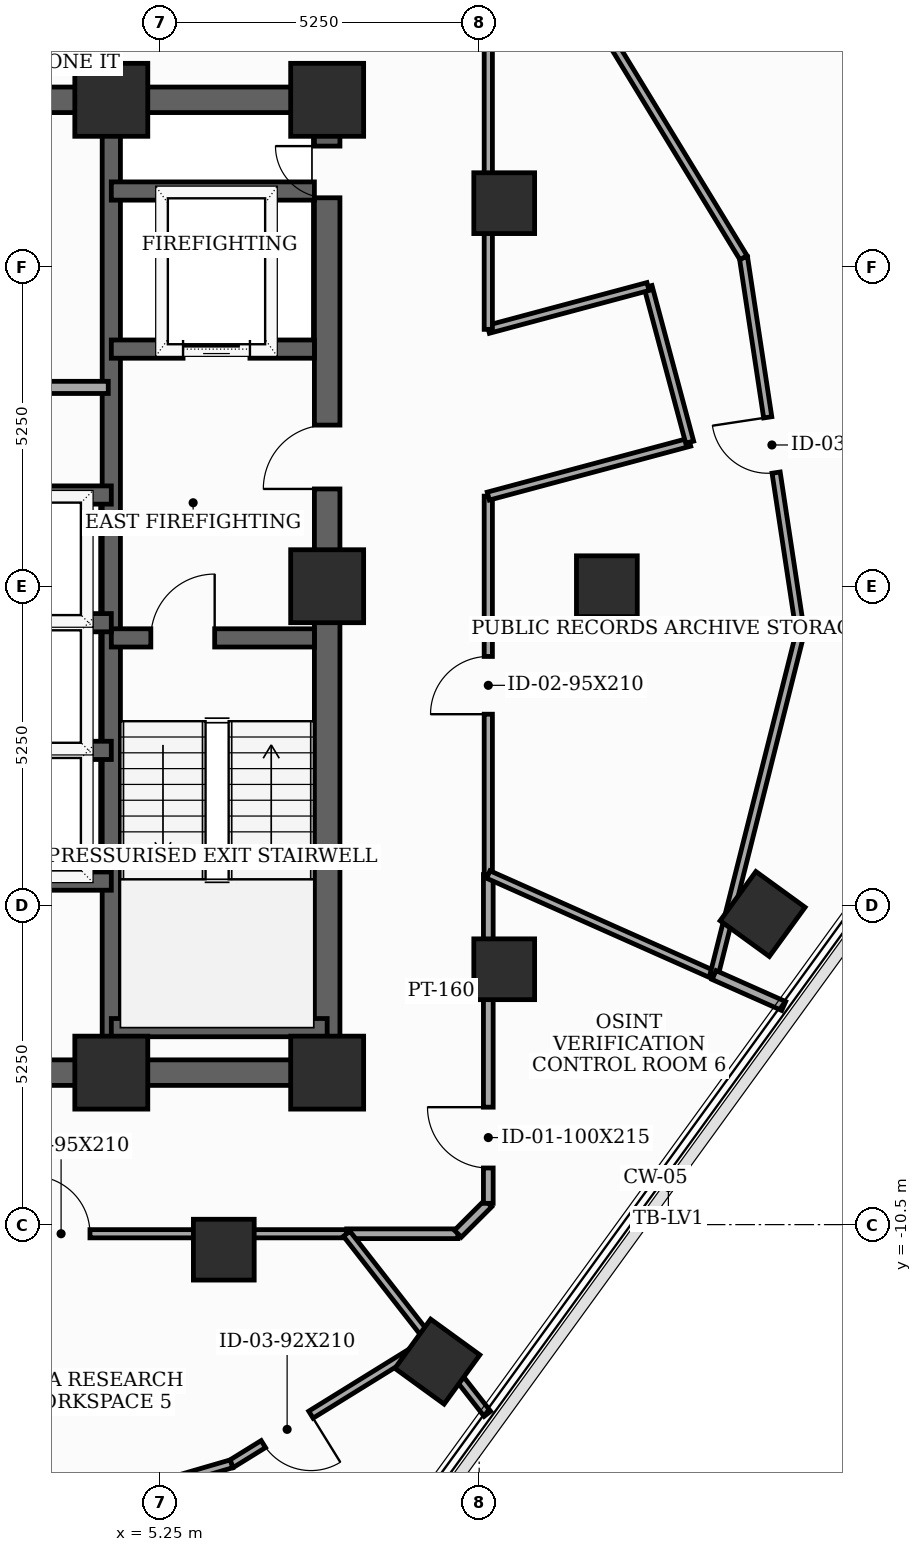
"""IFC4 building model, lengths in metres.
Left out: names, types, materials, properties, quantities, classifications, styles, units other than length and angle.
Written with IfcOpenShell. Run it as: python <this file> out.ifc"""

import sys

from ifc_helpers import new_model, si_unit, direction, frame, frame_2d, origin, origin_2d, place, context, subcontext, project, spatial, rectangle, extrude, element, fill, save


model = new_model("IFC4")
c1 = context("Model", 3, precision=1e-05, world=origin(), true_north=direction((0.0, 1.0)))
c2 = subcontext(c1, "Body", "Model", "MODEL_VIEW")
j1 = project(units=[si_unit("LENGTHUNIT", "METRE"), si_unit("PLANEANGLEUNIT", "RADIAN")], contexts=[c1])
p1 = place(None, origin())
s1 = spatial("IfcSite", under=j1, at=p1, CompositionType="ELEMENT")
p2 = place(p1, origin())
s2 = spatial("IfcBuilding", under=s1, at=p2, CompositionType="ELEMENT")
p3 = place(p2, frame((0.0, 0.0, 230.0)))
s3 = spatial("IfcBuildingStorey", under=s2, at=p3, CompositionType="ELEMENT", Elevation=230.0)
for number, where, z_axis, x_axis in (
    (1, (4.45, -8.0, 0.0), (0.0, 0.0, 1.0), (1.0, 0.0, 0.0)),
    (2, (8.0, -8.0, 0.0), (0.0, 0.0, 1.0), (1.0, 0.0, 0.0)),
    (3, (8.0, 0.0, 0.0), (0.0, 0.0, 1.0), (1.0, 0.0, 0.0)),
    (4, (8.0, 8.0, 0.0), (0.0, 0.0, 1.0), (1.0, 0.0, 0.0)),
    (5, (4.45, 8.0, 0.0), (0.0, 0.0, 1.0), (1.0, 0.0, 0.0)),
):
    element("IfcColumn", number, at=place(p3, frame(where, z_axis=z_axis, x_axis=x_axis)), inside=s3, PredefinedType="COLUMN", context=c2, shape_type="SweptSolid", body=[
        extrude(rectangle(XDim=1.2, YDim=1.2, at=origin_2d()), origin(), (0.0, 0.0, 1.0), 3.7),
    ])
for number, where, z_axis, x_axis in (
    (6, (12.6, 0.0, 0.0), (0.0, 0.0, 1.0), (1.0, 0.0, 0.0)),
    (7, (10.912, 6.3, 0.0), (0.0, 0.0, 1.0), (1.0, 0.0, 0.0)),
    (8, (6.3, -10.912, 0.0), (0.0, 0.0, 1.0), (1.0, 0.0, 0.0)),
    (9, (10.912, -6.3, 0.0), (0.0, 0.0, 1.0), (1.0, 0.0, 0.0)),
    (10, (9.812, -12.753, 0.0), (0.0, 0.0, 1.0), (0.588, 0.809, 0.0)),
    (11, (15.161, -5.391, 0.0), (0.0, 0.0, 1.0), (0.588, 0.809, 0.0)),
):
    element("IfcColumn", number, at=place(p3, frame(where, z_axis=z_axis, x_axis=x_axis)), inside=s3, PredefinedType="COLUMN", context=c2, shape_type="SweptSolid", body=[
        extrude(rectangle(XDim=1.0, YDim=1.0, at=origin_2d()), origin(), (0.0, 0.0, 1.0), 3.7),
    ])
p4 = place(p3, frame((8.0, -8.0, 0.0), z_axis=(0.0, 0.0, 1.0), x_axis=(0.0, 1.0, 0.0)))
e12 = element("IfcWall", 12, at=p4, inside=s3, PredefinedType="SHEAR", context=c2, shape_type="SweptSolid", body=[
    extrude(rectangle(XDim=16.0, YDim=0.42, at=frame_2d((8.0, 0.0))), origin(), (0.0, 0.0, 1.0), 3.5),
])
p5 = place(p4, frame((9.6, 0.0, 0.0)))
e13 = element("IfcOpeningElement", 13, at=p5, cuts=e12, PredefinedType="OPENING", context=c2, shape_type="SweptSolid", body=[
    extrude(rectangle(XDim=1.05, YDim=2.15, at=frame_2d((0.525, 1.075))), frame((0.0, 0.22, 0.0), z_axis=(0.0, -1.0, 0.0), x_axis=(1.0, 0.0, 0.0)), (0.0, 0.0, 1.0), 0.44),
])
p6 = place(p4, frame((14.389, 0.0, 0.0)))
e14 = element("IfcOpeningElement", 14, at=p6, cuts=e12, PredefinedType="OPENING", context=c2, shape_type="SweptSolid", body=[
    extrude(rectangle(XDim=0.85, YDim=2.02, at=frame_2d((0.425, 1.01))), frame((0.0, 0.22, 0.0), z_axis=(0.0, -1.0, 0.0), x_axis=(1.0, 0.0, 0.0)), (0.0, 0.0, 1.0), 0.44),
])
p7 = place(p3, frame((-8.0, -8.0, 0.0), z_axis=(0.0, 0.0, 1.0), x_axis=(1.0, 0.0, 0.0)))
e15 = element("IfcWall", 15, at=p7, inside=s3, PredefinedType="SHEAR", context=c2, shape_type="SweptSolid", body=[
    extrude(rectangle(XDim=16.0, YDim=0.42, at=frame_2d((8.0, 0.0))), origin(), (0.0, 0.0, 1.0), 3.5),
])
p8 = place(p7, frame((5.2, 0.0, 0.0)))
e16 = element("IfcOpeningElement", 16, at=p8, cuts=e15, PredefinedType="OPENING", context=c2, shape_type="SweptSolid", body=[
    extrude(rectangle(XDim=0.95, YDim=2.1, at=frame_2d((0.475, 1.05))), frame((0.0, 0.22, 0.0), z_axis=(0.0, -1.0, 0.0), x_axis=(1.0, 0.0, 0.0)), (0.0, 0.0, 1.0), 0.44),
])
p9 = place(p7, frame((9.8, 0.0, 0.0)))
e17 = element("IfcOpeningElement", 17, at=p9, cuts=e15, PredefinedType="OPENING", context=c2, shape_type="SweptSolid", body=[
    extrude(rectangle(XDim=0.95, YDim=2.1, at=frame_2d((0.475, 1.05))), frame((0.0, 0.22, 0.0), z_axis=(0.0, -1.0, 0.0), x_axis=(1.0, 0.0, 0.0)), (0.0, 0.0, 1.0), 0.44),
])
p10 = place(p3, frame((-8.0, 8.0, 0.0), z_axis=(0.0, 0.0, 1.0), x_axis=(1.0, 0.0, 0.0)))
e18 = element("IfcWall", 18, at=p10, inside=s3, PredefinedType="SHEAR", context=c2, shape_type="SweptSolid", body=[
    extrude(rectangle(XDim=16.0, YDim=0.42, at=frame_2d((8.0, 0.0))), origin(), (0.0, 0.0, 1.0), 3.5),
])
p11 = place(p10, frame((7.1, 0.0, 0.0)))
e19 = element("IfcOpeningElement", 19, at=p11, cuts=e18, PredefinedType="OPENING", context=c2, shape_type="SweptSolid", body=[
    extrude(rectangle(XDim=1.8, YDim=2.15, at=frame_2d((0.9, 1.075))), frame((0.0, 0.22, 0.0), z_axis=(0.0, -1.0, 0.0), x_axis=(1.0, 0.0, 0.0)), (0.0, 0.0, 1.0), 0.44),
])
p12 = place(p3, frame((4.45, -7.79, 0.0), z_axis=(0.0, 0.0, 1.0), x_axis=(0.0, 1.0, 0.0)))
e20 = element("IfcWall", 20, at=p12, inside=s3, PredefinedType="SHEAR", context=c2, shape_type="SweptSolid", body=[
    extrude(rectangle(XDim=15.58, YDim=0.3, at=frame_2d((7.79, 0.0))), origin(), (0.0, 0.0, 1.0), 3.5),
])
p13 = place(p3, frame((4.45, -0.85, 0.0), z_axis=(0.0, 0.0, 1.0), x_axis=(1.0, 0.0, 0.0)))
e21 = element("IfcWall", 21, at=p13, inside=s3, PredefinedType="SHEAR", context=c2, shape_type="SweptSolid", body=[
    extrude(rectangle(XDim=3.34, YDim=0.3, at=frame_2d((1.67, 0.0))), origin(), (0.0, 0.0, 1.0), 3.5),
])
p14 = place(p13, frame((0.65, 0.0, 0.0)))
e22 = element("IfcOpeningElement", 22, at=p14, cuts=e21, PredefinedType="OPENING", context=c2, shape_type="SweptSolid", body=[
    extrude(rectangle(XDim=1.05, YDim=2.15, at=frame_2d((0.525, 1.075))), frame((0.0, 0.16, 0.0), z_axis=(0.0, -1.0, 0.0), x_axis=(1.0, 0.0, 0.0)), (0.0, 0.0, 1.0), 0.32),
])
p15 = place(p3, frame((4.45, -7.26, 0.0), z_axis=(0.0, 0.0, 1.0), x_axis=(1.0, 0.0, 0.0)))
e23 = element("IfcWall", 23, at=p15, inside=s3, PredefinedType="SHEAR", context=c2, shape_type="SweptSolid", body=[
    extrude(rectangle(XDim=3.55, YDim=0.3, at=frame_2d((1.775, 0.0))), origin(), (0.0, 0.0, 1.0), 3.5),
])
p16 = place(p3, frame((4.45, 3.9, 0.0), z_axis=(0.0, 0.0, 1.0), x_axis=(1.0, 0.0, 0.0)))
e24 = element("IfcWall", 24, at=p16, inside=s3, PredefinedType="SHEAR", context=c2, shape_type="SweptSolid", body=[
    extrude(rectangle(XDim=3.34, YDim=0.3, at=frame_2d((1.67, 0.0))), origin(), (0.0, 0.0, 1.0), 3.5),
])
p17 = place(p16, frame((1.18, 0.0, 0.0)))
e25 = element("IfcOpeningElement", 25, at=p17, cuts=e24, PredefinedType="OPENING", context=c2, shape_type="SweptSolid", body=[
    extrude(rectangle(XDim=1.1, YDim=2.1, at=frame_2d((0.55, 1.05))), frame((0.0, 0.16, 0.0), z_axis=(0.0, -1.0, 0.0), x_axis=(1.0, 0.0, 0.0)), (0.0, 0.0, 1.0), 0.32),
])
p18 = place(p3, frame((4.45, 6.5, 0.0), z_axis=(0.0, 0.0, 1.0), x_axis=(1.0, 0.0, 0.0)))
e26 = element("IfcWall", 26, at=p18, inside=s3, PredefinedType="SHEAR", context=c2, shape_type="SweptSolid", body=[
    extrude(rectangle(XDim=3.34, YDim=0.3, at=frame_2d((1.67, 0.0))), origin(), (0.0, 0.0, 1.0), 3.5),
])
p19 = place(p3, frame((-4.45, -4.85, 0.0), z_axis=(0.0, 0.0, 1.0), x_axis=(1.0, 0.0, 0.0)))
e27 = element("IfcWall", 27, at=p19, inside=s3, PredefinedType="SHEAR", context=c2, shape_type="SweptSolid", body=[
    extrude(rectangle(XDim=8.9, YDim=0.3, at=frame_2d((4.45, 0.0))), origin(), (0.0, 0.0, 1.0), 3.5),
])
for number, where, z_axis, x_axis in (
    (28, (1.68, 1.5, 0.0), (0.0, 0.0, 1.0), (1.0, 0.0, 0.0)),
    (29, (1.68, -2.7, 0.0), (0.0, 0.0, 1.0), (1.0, 0.0, 0.0)),
    (30, (1.68, -0.6, 0.0), (0.0, 0.0, 1.0), (1.0, 0.0, 0.0)),
):
    element("IfcWall", number, at=place(p3, frame(where, z_axis=z_axis, x_axis=x_axis)), inside=s3, PredefinedType="SHEAR", context=c2, shape_type="SweptSolid", body=[
        extrude(rectangle(XDim=2.77, YDim=0.3, at=frame_2d((1.385, 0.0))), origin(), (0.0, 0.0, 1.0), 3.5),
    ])
p20 = place(p3, frame((1.72, 3.27, 0.0), z_axis=(0.0, 0.0, 1.0), x_axis=(1.0, 0.0, 0.0)))
e31 = element("IfcWall", 31, at=p20, inside=s3, PredefinedType="SOLIDWALL", context=c2, shape_type="SweptSolid", body=[
    extrude(rectangle(XDim=2.68, YDim=0.2, at=frame_2d((1.34, 0.0))), origin(), (0.0, 0.0, 1.0), 3.5),
])
p21 = place(p3, frame((10.65, -4.742, 0.0), z_axis=(0.0, 0.0, 1.0), x_axis=(0.0, 1.0, 0.0)))
e32 = element("IfcWall", 32, at=p21, inside=s3, PredefinedType="PARTITIONING", context=c2, shape_type="SweptSolid", body=[
    extrude(rectangle(XDim=6.224, YDim=0.135, at=frame_2d((3.112, 0.0))), origin(), (0.0, 0.0, 1.0), 2.885),
])
p22 = place(p21, frame((2.637, 0.0, 0.0)))
e33 = element("IfcOpeningElement", 33, at=p22, cuts=e32, PredefinedType="OPENING", context=c2, shape_type="SweptSolid", body=[
    extrude(rectangle(XDim=0.95, YDim=2.1, at=frame_2d((0.475, 1.05))), frame((0.0, 0.077, 0.0), z_axis=(0.0, -1.0, 0.0), x_axis=(1.0, 0.0, 0.0)), (0.0, 0.0, 1.0), 0.155),
])
p23 = place(p3, frame((10.65, 1.482, 0.0), z_axis=(0.0, 0.0, 1.0), x_axis=(0.965961397105, 0.2586862565, 0.0)))
e34 = element("IfcWall", 34, at=p23, inside=s3, PredefinedType="PARTITIONING", context=c2, shape_type="SweptSolid", body=[
    extrude(rectangle(XDim=3.429, YDim=0.135, at=frame_2d((1.714, 0.0))), origin(), (0.0, 0.0, 1.0), 2.885),
])
p24 = place(p3, frame((13.962, 2.369, 0.0), z_axis=(0.0, 0.0, 1.0), x_axis=(-0.258413725385, 0.966034340245, 0.0)))
e35 = element("IfcWall", 35, at=p24, inside=s3, PredefinedType="PARTITIONING", context=c2, shape_type="SweptSolid", body=[
    extrude(rectangle(XDim=2.65, YDim=0.135, at=frame_2d((1.325, 0.0))), origin(), (0.0, 0.0, 1.0), 3.5),
])
p25 = place(p3, frame((13.277, 4.929, 0.0), z_axis=(0.0, 0.0, 1.0), x_axis=(-0.965934830229, -0.258785439601, 0.0)))
e36 = element("IfcWall", 36, at=p25, inside=s3, PredefinedType="PARTITIONING", context=c2, shape_type="SweptSolid", body=[
    extrude(rectangle(XDim=2.72, YDim=0.135, at=frame_2d((1.36, 0.0))), origin(), (0.0, 0.0, 1.0), 2.885),
])
p26 = place(p3, frame((10.65, 4.225, 0.0), z_axis=(0.0, 0.0, 1.0), x_axis=(0.0, 1.0, 0.0)))
e37 = element("IfcWall", 37, at=p26, inside=s3, PredefinedType="PARTITIONING", context=c2, shape_type="SweptSolid", body=[
    extrude(rectangle(XDim=5.925, YDim=0.135, at=frame_2d((2.962, 0.0))), origin(), (0.0, 0.0, 1.0), 2.885),
])
p27 = place(p3, frame((2.45, -10.65, 0.0), z_axis=(0.0, 0.0, 1.0), x_axis=(1.0, 0.0, 0.0)))
e38 = element("IfcWall", 38, at=p27, inside=s3, PredefinedType="PARTITIONING", context=c2, shape_type="SweptSolid", body=[
    extrude(rectangle(XDim=5.871, YDim=0.135, at=frame_2d((2.936, 0.0))), origin(), (0.0, 0.0, 1.0), 2.885),
])
p28 = place(p27, frame((0.699, 0.0, 0.0)))
e39 = element("IfcOpeningElement", 39, at=p28, cuts=e38, PredefinedType="OPENING", context=c2, shape_type="SweptSolid", body=[
    extrude(rectangle(XDim=0.95, YDim=2.1, at=frame_2d((0.475, 1.05))), frame((0.0, 0.077, 0.0), z_axis=(0.0, -1.0, 0.0), x_axis=(1.0, 0.0, 0.0)), (0.0, 0.0, 1.0), 0.155),
])
p29 = place(p3, frame((8.321, -10.65, 0.0), z_axis=(0.0, 0.0, 1.0), x_axis=(1.0, 0.0, 0.0)))
e40 = element("IfcWall", 40, at=p29, inside=s3, PredefinedType="PARTITIONING", context=c2, shape_type="SweptSolid", body=[
    extrude(rectangle(XDim=1.829, YDim=0.16, at=frame_2d((0.915, 0.0))), origin(), (0.0, 0.0, 1.0), 3.5),
])
p30 = place(p3, frame((10.15, -10.65, 0.0), z_axis=(0.0, 0.0, 1.0), x_axis=(0.707106781187, 0.707106781187, 0.0)))
e41 = element("IfcWall", 41, at=p30, inside=s3, PredefinedType="PARTITIONING", context=c2, shape_type="SweptSolid", body=[
    extrude(rectangle(XDim=0.707, YDim=0.16, at=frame_2d((0.354, 0.0))), origin(), (0.0, 0.0, 1.0), 3.5),
])
p31 = place(p3, frame((10.65, -10.15, 0.0), z_axis=(0.0, 0.0, 1.0), x_axis=(0.0, 1.0, 0.0)))
e42 = element("IfcWall", 42, at=p31, inside=s3, PredefinedType="PARTITIONING", context=c2, shape_type="SweptSolid", body=[
    extrude(rectangle(XDim=5.408, YDim=0.16, at=frame_2d((2.704, 0.0))), origin(), (0.0, 0.0, 1.0), 2.885),
])
p32 = place(p31, frame((0.582, 0.0, 0.0)))
e43 = element("IfcOpeningElement", 43, at=p32, cuts=e42, PredefinedType="OPENING", context=c2, shape_type="SweptSolid", body=[
    extrude(rectangle(XDim=1.0, YDim=2.15, at=frame_2d((0.5, 1.075))), frame((0.0, 0.09, 0.0), z_axis=(0.0, -1.0, 0.0), x_axis=(1.0, 0.0, 0.0)), (0.0, 0.0, 1.0), 0.18),
])
p33 = place(p3, frame((10.65, -4.742, 0.0), z_axis=(0.0, 0.0, 1.0), x_axis=(0.913556239153, -0.406712426544, 0.0)))
e44 = element("IfcWall", 44, at=p33, inside=s3, PredefinedType="PARTITIONING", context=c2, shape_type="SweptSolid", body=[
    extrude(rectangle(XDim=4.064, YDim=0.135, at=frame_2d((2.032, 0.0))), origin(), (0.0, 0.0, 1.0), 2.885),
])
p34 = place(p3, frame((14.363, -6.395, 0.0), z_axis=(0.0, 0.0, 1.0), x_axis=(0.244106617879, 0.969748399899, 0.0)))
e45 = element("IfcWall", 45, at=p34, inside=s3, PredefinedType="PARTITIONING", context=c2, shape_type="SweptSolid", body=[
    extrude(rectangle(XDim=5.813, YDim=0.135, at=frame_2d((2.906, 0.0))), origin(), (0.0, 0.0, 1.0), 2.985),
])
p35 = place(p3, frame((15.782, -0.758, 0.0), z_axis=(0.0, 0.0, 1.0), x_axis=(-0.150025845784, 0.988682075086, 0.0)))
e46 = element("IfcWall", 46, at=p35, inside=s3, PredefinedType="PARTITIONING", context=c2, shape_type="SweptSolid", body=[
    extrude(rectangle(XDim=6.233, YDim=0.135, at=frame_2d((3.116, 0.0))), origin(), (0.0, 0.0, 1.0), 2.985),
])
p36 = place(p35, frame((2.656, 0.0, 0.0)))
e47 = element("IfcOpeningElement", 47, at=p36, cuts=e46, PredefinedType="OPENING", context=c2, shape_type="SweptSolid", body=[
    extrude(rectangle(XDim=0.92, YDim=2.1, at=frame_2d((0.46, 1.05))), frame((0.0, 0.077, 0.0), z_axis=(0.0, -1.0, 0.0), x_axis=(1.0, 0.0, 0.0)), (0.0, 0.0, 1.0), 0.155),
])
p37 = place(p3, frame((14.847, 5.404, 0.0), z_axis=(0.0, 0.0, 1.0), x_axis=(-0.520646426704, 0.853772392597, 0.0)))
e48 = element("IfcWall", 48, at=p37, inside=s3, PredefinedType="PARTITIONING", context=c2, shape_type="SweptSolid", body=[
    extrude(rectangle(XDim=6.232, YDim=0.135, at=frame_2d((3.116, 0.0))), origin(), (0.0, 0.0, 1.0), 2.985),
])
p38 = place(p3, frame((9.696, -12.411, 0.0), z_axis=(0.0, 0.0, 1.0), x_axis=(-0.850393663863, -0.526146953295, 0.0)))
e49 = element("IfcWall", 49, at=p38, inside=s3, PredefinedType="PARTITIONING", context=c2, shape_type="SweptSolid", body=[
    extrude(rectangle(XDim=3.845, YDim=0.135, at=frame_2d((1.923, 0.0))), origin(), (0.0, 0.0, 1.0), 2.985),
])
p39 = place(p38, frame((2.309, 0.0, 0.0)))
e50 = element("IfcOpeningElement", 50, at=p39, cuts=e49, PredefinedType="OPENING", context=c2, shape_type="SweptSolid", body=[
    extrude(rectangle(XDim=0.92, YDim=2.1, at=frame_2d((0.46, 1.05))), frame((0.0, 0.077, 0.0), z_axis=(0.0, -1.0, 0.0), x_axis=(1.0, 0.0, 0.0)), (0.0, 0.0, 1.0), 0.155),
])
p40 = place(p3, frame((6.426, -14.434, 0.0), z_axis=(0.0, 0.0, 1.0), x_axis=(-0.960041241254, -0.279858562654, 0.0)))
e51 = element("IfcWall", 51, at=p40, inside=s3, PredefinedType="PARTITIONING", context=c2, shape_type="SweptSolid", body=[
    extrude(rectangle(XDim=3.844, YDim=0.135, at=frame_2d((1.922, 0.0))), origin(), (0.0, 0.0, 1.0), 3.5),
])
p41 = place(p3, frame((10.635, -13.612, 0.0), z_axis=(0.0, 0.0, 1.0), x_axis=(-0.615768345532, 0.787927245779, 0.0)))
e52 = element("IfcWall", 52, at=p41, inside=s3, PredefinedType="PARTITIONING", context=c2, shape_type="SweptSolid", body=[
    extrude(rectangle(XDim=1.524, YDim=0.135, at=frame_2d((0.762, 0.0))), origin(), (0.0, 0.0, 1.0), 2.985),
])
p42 = place(p3, frame((9.696, -12.411, 0.0), z_axis=(0.0, 0.0, 1.0), x_axis=(-0.615429845305, 0.788191668002, 0.0)))
e53 = element("IfcWall", 53, at=p42, inside=s3, PredefinedType="PARTITIONING", context=c2, shape_type="SweptSolid", body=[
    extrude(rectangle(XDim=2.234, YDim=0.135, at=frame_2d((1.117, 0.0))), origin(), (0.0, 0.0, 1.0), 2.985),
])
p43 = place(p3, frame((15.508, -6.905, 0.0), z_axis=(0.0, 0.0, 1.0), x_axis=(-0.913626692327, 0.406554137929, 0.0)))
e54 = element("IfcWall", 54, at=p43, inside=s3, PredefinedType="PARTITIONING", context=c2, shape_type="SweptSolid", body=[
    extrude(rectangle(XDim=1.253, YDim=0.16, at=frame_2d((0.626, 0.0))), origin(), (0.0, 0.0, 1.0), 3.035),
])
p44 = place(p5, origin())
e55 = element("IfcDoor", 55, at=p44, inside=s3, OperationType="SINGLE_SWING_LEFT", PredefinedType="DOOR", context=c2, shape_type="SweptSolid", body=[
    extrude(rectangle(XDim=1.05, YDim=2.15, at=frame_2d((0.525, 1.075))), frame((0.0, 0.025, 0.0), z_axis=(0.0, -1.0, 0.0), x_axis=(1.0, 0.0, 0.0)), (0.0, 0.0, 1.0), 0.05),
])
fill(e13, e55)
p45 = place(p6, origin())
e56 = element("IfcDoor", 56, at=p45, inside=s3, OperationType="SINGLE_SWING_RIGHT", PredefinedType="TRAPDOOR", context=c2, shape_type="SweptSolid", body=[
    extrude(rectangle(XDim=0.85, YDim=2.02, at=frame_2d((0.425, 1.01))), frame((0.0, 0.025, 0.0), z_axis=(0.0, -1.0, 0.0), x_axis=(1.0, 0.0, 0.0)), (0.0, 0.0, 1.0), 0.05),
])
fill(e14, e56)
p46 = place(p14, origin())
e57 = element("IfcDoor", 57, at=p46, inside=s3, OperationType="SINGLE_SWING_RIGHT", PredefinedType="DOOR", context=c2, shape_type="SweptSolid", body=[
    extrude(rectangle(XDim=1.05, YDim=2.15, at=frame_2d((0.525, 1.075))), frame((0.0, 0.025, 0.0), z_axis=(0.0, -1.0, 0.0), x_axis=(1.0, 0.0, 0.0)), (0.0, 0.0, 1.0), 0.05),
])
fill(e22, e57)
p47 = place(p17, origin())
e58 = element("IfcDoor", 58, at=p47, inside=s3, OperationType="SLIDING_TO_LEFT", PredefinedType="DOOR", context=c2, shape_type="SweptSolid", body=[
    extrude(rectangle(XDim=1.1, YDim=2.1, at=frame_2d((0.55, 1.05))), frame((0.0, 0.025, 0.0), z_axis=(0.0, -1.0, 0.0), x_axis=(1.0, 0.0, 0.0)), (0.0, 0.0, 1.0), 0.05),
])
fill(e25, e58)
p48 = place(p22, origin())
e59 = element("IfcDoor", 59, at=p48, inside=s3, OperationType="SINGLE_SWING_LEFT", PredefinedType="DOOR", context=c2, shape_type="SweptSolid", body=[
    extrude(rectangle(XDim=0.95, YDim=2.1, at=frame_2d((0.475, 1.05))), frame((0.0, 0.025, 0.0), z_axis=(0.0, -1.0, 0.0), x_axis=(1.0, 0.0, 0.0)), (0.0, 0.0, 1.0), 0.05),
])
fill(e33, e59)
p49 = place(p28, origin())
e60 = element("IfcDoor", 60, at=p49, inside=s3, OperationType="SINGLE_SWING_LEFT", PredefinedType="DOOR", context=c2, shape_type="SweptSolid", body=[
    extrude(rectangle(XDim=0.95, YDim=2.1, at=frame_2d((0.475, 1.05))), frame((0.0, 0.025, 0.0), z_axis=(0.0, -1.0, 0.0), x_axis=(1.0, 0.0, 0.0)), (0.0, 0.0, 1.0), 0.05),
])
fill(e39, e60)
p50 = place(p32, origin())
e61 = element("IfcDoor", 61, at=p50, inside=s3, OperationType="SINGLE_SWING_RIGHT", PredefinedType="DOOR", context=c2, shape_type="SweptSolid", body=[
    extrude(rectangle(XDim=1.0, YDim=2.15, at=frame_2d((0.5, 1.075))), frame((0.0, 0.025, 0.0), z_axis=(0.0, -1.0, 0.0), x_axis=(1.0, 0.0, 0.0)), (0.0, 0.0, 1.0), 0.05),
])
fill(e43, e61)
p51 = place(p36, origin())
e62 = element("IfcDoor", 62, at=p51, inside=s3, OperationType="SINGLE_SWING_RIGHT", PredefinedType="DOOR", context=c2, shape_type="SweptSolid", body=[
    extrude(rectangle(XDim=0.92, YDim=2.1, at=frame_2d((0.46, 1.05))), frame((0.0, 0.025, 0.0), z_axis=(0.0, -1.0, 0.0), x_axis=(1.0, 0.0, 0.0)), (0.0, 0.0, 1.0), 0.05),
])
fill(e47, e62)
p52 = place(p39, origin())
e63 = element("IfcDoor", 63, at=p52, inside=s3, OperationType="SINGLE_SWING_LEFT", PredefinedType="DOOR", context=c2, shape_type="SweptSolid", body=[
    extrude(rectangle(XDim=0.92, YDim=2.1, at=frame_2d((0.46, 1.05))), frame((0.0, 0.025, 0.0), z_axis=(0.0, -1.0, 0.0), x_axis=(1.0, 0.0, 0.0)), (0.0, 0.0, 1.0), 0.05),
])
fill(e50, e63)
save(model, sys.argv[1])
